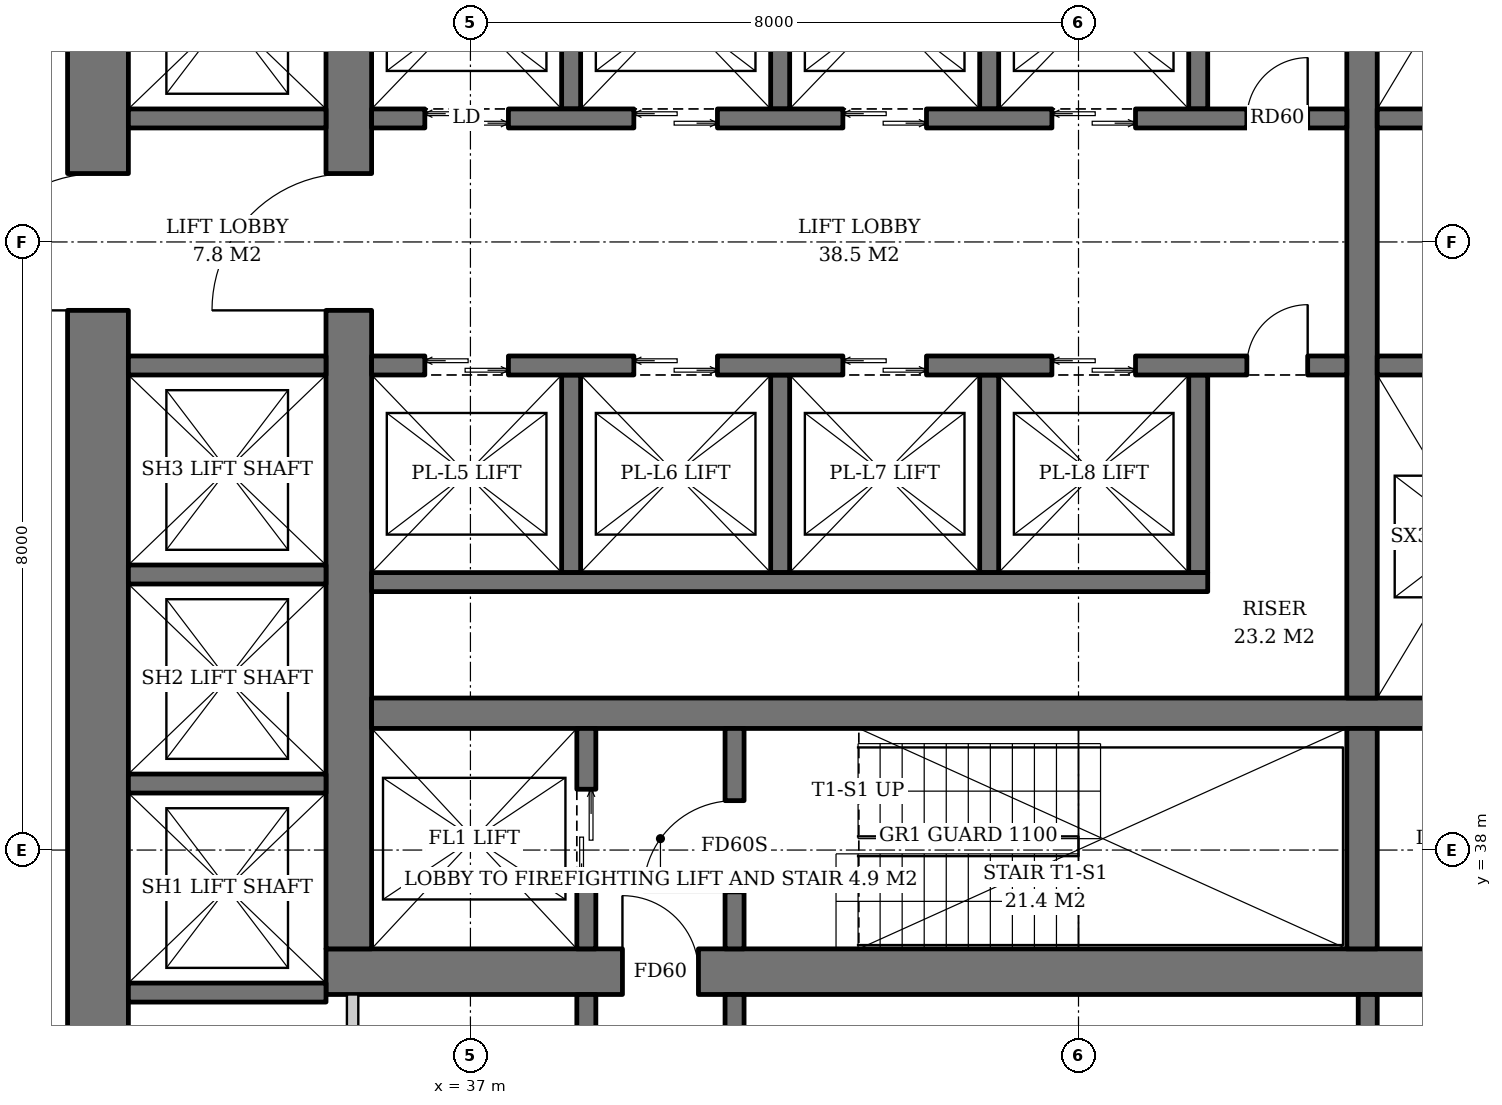
"""IFC4 building model, lengths in metres.
Left out: names, types, materials, properties, quantities, classifications, styles, units other than length and angle.
Written with IfcOpenShell. Run it as: python <this file> out.ifc"""

import sys

from ifc_helpers import new_model, si_unit, direction, frame, frame_2d, origin, place, context, subcontext, project, spatial, rectangle, extrude, element, fill, save


model = new_model("IFC4")
c1 = context("Model", 3, precision=1e-05, world=origin(), true_north=direction((0.0, 1.0)))
c2 = subcontext(c1, "Body", "Model", "MODEL_VIEW")
j1 = project(units=[si_unit("LENGTHUNIT", "METRE"), si_unit("PLANEANGLEUNIT", "RADIAN")], contexts=[c1])
p1 = place(None, origin())
s1 = spatial("IfcSite", under=j1, at=p1, CompositionType="ELEMENT")
p2 = place(p1, origin())
s2 = spatial("IfcBuilding", under=s1, at=p2, CompositionType="ELEMENT")
p3 = place(p2, frame((0.0, 0.0, 70.4)))
s3 = spatial("IfcBuildingStorey", under=s2, at=p3, CompositionType="ELEMENT", Elevation=70.4)
p4 = place(p3, frame((35.1, 36.4, 0.0), z_axis=(0.0, 0.0, 1.0), x_axis=(1.0, 0.0, 0.0)))
e1 = element("IfcWall", 1, at=p4, inside=s3, PredefinedType="SHEAR", context=c2, shape_type="SweptSolid", body=[
    extrude(rectangle(XDim=19.8, YDim=0.6, at=frame_2d((9.9, 0.0))), origin(), (0.0, 0.0, 1.0), 3.8),
])
p5 = place(p4, frame((3.9, 0.0, 0.0)))
e2 = element("IfcOpeningElement", 2, at=p5, cuts=e1, PredefinedType="OPENING", context=c2, shape_type="SweptSolid", body=[
    extrude(rectangle(XDim=1.0, YDim=2.1, at=frame_2d((0.5, 1.05))), frame((0.0, 0.31, 0.0), z_axis=(0.0, -1.0, 0.0), x_axis=(1.0, 0.0, 0.0)), (0.0, 0.0, 1.0), 0.62),
])
p6 = place(p4, frame((15.35, 0.0, 0.0)))
e3 = element("IfcOpeningElement", 3, at=p6, cuts=e1, PredefinedType="OPENING", context=c2, shape_type="SweptSolid", body=[
    extrude(rectangle(XDim=1.0, YDim=2.1, at=frame_2d((0.5, 1.05))), frame((0.0, 0.31, 0.0), z_axis=(0.0, -1.0, 0.0), x_axis=(1.0, 0.0, 0.0)), (0.0, 0.0, 1.0), 0.62),
])
p7 = place(p3, frame((35.4, 36.7, 0.0), z_axis=(0.0, 0.0, 1.0), x_axis=(0.0, 1.0, 0.0)))
e4 = element("IfcWall", 4, at=p7, inside=s3, PredefinedType="SHEAR", context=c2, shape_type="SweptSolid", body=[
    extrude(rectangle(XDim=18.6, YDim=0.6, at=frame_2d((9.3, 0.0))), origin(), (0.0, 0.0, 1.0), 3.8),
])
p8 = place(p7, frame((8.4, 0.0, 0.0)))
e5 = element("IfcOpeningElement", 5, at=p8, cuts=e4, PredefinedType="OPENING", context=c2, shape_type="SweptSolid", body=[
    extrude(rectangle(XDim=1.8, YDim=2.4, at=frame_2d((0.9, 1.2))), frame((0.0, 0.31, 0.0), z_axis=(0.0, -1.0, 0.0), x_axis=(1.0, 0.0, 0.0)), (0.0, 0.0, 1.0), 0.62),
])
p9 = place(p3, frame((32.1, 33.5, 0.0), z_axis=(0.0, 0.0, 1.0), x_axis=(0.0, 1.0, 0.0)))
e6 = element("IfcWall", 6, at=p9, inside=s3, PredefinedType="SHEAR", context=c2, shape_type="SweptSolid", body=[
    extrude(rectangle(XDim=25.0, YDim=0.8, at=frame_2d((12.5, 0.0))), origin(), (0.0, 0.0, 1.0), 3.8),
])
p10 = place(p9, frame((11.6, 0.0, 0.0)))
e7 = element("IfcOpeningElement", 7, at=p10, cuts=e6, PredefinedType="OPENING", context=c2, shape_type="SweptSolid", body=[
    extrude(rectangle(XDim=1.8, YDim=2.4, at=frame_2d((0.9, 1.2))), frame((0.0, 0.41, 0.0), z_axis=(0.0, -1.0, 0.0), x_axis=(1.0, 0.0, 0.0)), (0.0, 0.0, 1.0), 0.82),
])
p11 = place(p3, frame((35.7, 39.8, 0.0), z_axis=(0.0, 0.0, 1.0), x_axis=(1.0, 0.0, 0.0)))
e8 = element("IfcWall", 8, at=p11, inside=s3, PredefinedType="SHEAR", context=c2, shape_type="SweptSolid", body=[
    extrude(rectangle(XDim=18.6, YDim=0.4, at=frame_2d((9.3, 0.0))), origin(), (0.0, 0.0, 1.0), 3.8),
])
p12 = place(p3, frame((48.73, 36.7, 0.0), z_axis=(0.0, 0.0, 1.0), x_axis=(0.0, 1.0, 0.0)))
e9 = element("IfcWall", 9, at=p12, inside=s3, PredefinedType="SHEAR", context=c2, shape_type="SweptSolid", body=[
    extrude(rectangle(XDim=2.9, YDim=0.4, at=frame_2d((1.45, 0.0))), origin(), (0.0, 0.0, 1.0), 3.8),
])
p13 = place(p3, frame((48.73, 40.0, 0.0), z_axis=(0.0, 0.0, 1.0), x_axis=(0.0, 1.0, 0.0)))
e10 = element("IfcWall", 10, at=p13, inside=s3, PredefinedType="SHEAR", context=c2, shape_type="SweptSolid", body=[
    extrude(rectangle(XDim=12.0, YDim=0.4, at=frame_2d((6.0, 0.0))), origin(), (0.0, 0.0, 1.0), 3.8),
])
p14 = place(p3, frame((38.525, 36.7, 0.0), z_axis=(0.0, 0.0, 1.0), x_axis=(0.0, 1.0, 0.0)))
e11 = element("IfcWall", 11, at=p14, inside=s3, PredefinedType="SHEAR", context=c2, shape_type="SweptSolid", body=[
    extrude(rectangle(XDim=2.9, YDim=0.25, at=frame_2d((1.45, 0.0))), origin(), (0.0, 0.0, 1.0), 3.8),
])
p15 = place(p14, frame((0.8, 0.0, 0.0)))
e12 = element("IfcOpeningElement", 12, at=p15, cuts=e11, PredefinedType="OPENING", context=c2, shape_type="SweptSolid", body=[
    extrude(rectangle(XDim=1.3, YDim=2.2, at=frame_2d((0.65, 1.1))), frame((0.0, 0.135, 0.0), z_axis=(0.0, -1.0, 0.0), x_axis=(1.0, 0.0, 0.0)), (0.0, 0.0, 1.0), 0.27),
])
p16 = place(p3, frame((40.475, 36.7, 0.0), z_axis=(0.0, 0.0, 1.0), x_axis=(0.0, 1.0, 0.0)))
e13 = element("IfcWall", 13, at=p16, inside=s3, PredefinedType="SHEAR", context=c2, shape_type="SweptSolid", body=[
    extrude(rectangle(XDim=2.9, YDim=0.25, at=frame_2d((1.45, 0.0))), origin(), (0.0, 0.0, 1.0), 3.8),
])
p17 = place(p16, frame((0.75, 0.0, 0.0)))
e14 = element("IfcOpeningElement", 14, at=p17, cuts=e13, PredefinedType="OPENING", context=c2, shape_type="SweptSolid", body=[
    extrude(rectangle(XDim=1.2, YDim=2.1, at=frame_2d((0.6, 1.05))), frame((0.0, 0.135, 0.0), z_axis=(0.0, -1.0, 0.0), x_axis=(1.0, 0.0, 0.0)), (0.0, 0.0, 1.0), 0.27),
])
for number, where, z_axis, x_axis in (
    (15, (38.325, 47.75, 0.0), (0.0, 0.0, 1.0), (0.0, 1.0, 0.0)),
    (16, (41.075, 47.75, 0.0), (0.0, 0.0, 1.0), (0.0, 1.0, 0.0)),
    (17, (43.825, 47.75, 0.0), (0.0, 0.0, 1.0), (0.0, 1.0, 0.0)),
    (18, (46.575, 47.75, 0.0), (0.0, 0.0, 1.0), (0.0, 1.0, 0.0)),
):
    element("IfcWall", number, at=place(p3, frame(where, z_axis=z_axis, x_axis=x_axis)), inside=s3, PredefinedType="SHEAR", context=c2, shape_type="SweptSolid", body=[
        extrude(rectangle(XDim=2.6, YDim=0.25, at=frame_2d((1.3, 0.0))), origin(), (0.0, 0.0, 1.0), 3.8),
    ])
p18 = place(p3, frame((35.7, 47.625, 0.0), z_axis=(0.0, 0.0, 1.0), x_axis=(1.0, 0.0, 0.0)))
e19 = element("IfcWall", 19, at=p18, inside=s3, PredefinedType="SHEAR", context=c2, shape_type="SweptSolid", body=[
    extrude(rectangle(XDim=12.83, YDim=0.25, at=frame_2d((6.415, 0.0))), origin(), (0.0, 0.0, 1.0), 3.8),
])
p19 = place(p18, frame((0.7, 0.0, 0.0)))
e20 = element("IfcOpeningElement", 20, at=p19, cuts=e19, PredefinedType="OPENING", context=c2, shape_type="SweptSolid", body=[
    extrude(rectangle(XDim=1.1, YDim=2.2, at=frame_2d((0.55, 1.1))), frame((0.0, 0.135, 0.0), z_axis=(0.0, -1.0, 0.0), x_axis=(1.0, 0.0, 0.0)), (0.0, 0.0, 1.0), 0.27),
])
p20 = place(p18, frame((3.45, 0.0, 0.0)))
e21 = element("IfcOpeningElement", 21, at=p20, cuts=e19, PredefinedType="OPENING", context=c2, shape_type="SweptSolid", body=[
    extrude(rectangle(XDim=1.1, YDim=2.2, at=frame_2d((0.55, 1.1))), frame((0.0, 0.135, 0.0), z_axis=(0.0, -1.0, 0.0), x_axis=(1.0, 0.0, 0.0)), (0.0, 0.0, 1.0), 0.27),
])
p21 = place(p18, frame((6.2, 0.0, 0.0)))
e22 = element("IfcOpeningElement", 22, at=p21, cuts=e19, PredefinedType="OPENING", context=c2, shape_type="SweptSolid", body=[
    extrude(rectangle(XDim=1.1, YDim=2.2, at=frame_2d((0.55, 1.1))), frame((0.0, 0.135, 0.0), z_axis=(0.0, -1.0, 0.0), x_axis=(1.0, 0.0, 0.0)), (0.0, 0.0, 1.0), 0.27),
])
p22 = place(p18, frame((8.95, 0.0, 0.0)))
e23 = element("IfcOpeningElement", 23, at=p22, cuts=e19, PredefinedType="OPENING", context=c2, shape_type="SweptSolid", body=[
    extrude(rectangle(XDim=1.1, YDim=2.2, at=frame_2d((0.55, 1.1))), frame((0.0, 0.135, 0.0), z_axis=(0.0, -1.0, 0.0), x_axis=(1.0, 0.0, 0.0)), (0.0, 0.0, 1.0), 0.27),
])
p23 = place(p18, frame((11.515, 0.0, 0.0)))
e24 = element("IfcOpeningElement", 24, at=p23, cuts=e19, PredefinedType="OPENING", context=c2, shape_type="SweptSolid", body=[
    extrude(rectangle(XDim=0.8, YDim=2.0, at=frame_2d((0.4, 1.0))), frame((0.0, 0.135, 0.0), z_axis=(0.0, -1.0, 0.0), x_axis=(1.0, 0.0, 0.0)), (0.0, 0.0, 1.0), 0.27),
])
for number, where, z_axis, x_axis in (
    (25, (38.325, 44.25, 0.0), (0.0, 0.0, 1.0), (0.0, -1.0, 0.0)),
    (26, (41.075, 44.25, 0.0), (0.0, 0.0, 1.0), (0.0, -1.0, 0.0)),
    (27, (43.825, 44.25, 0.0), (0.0, 0.0, 1.0), (0.0, -1.0, 0.0)),
    (28, (46.575, 44.25, 0.0), (0.0, 0.0, 1.0), (0.0, -1.0, 0.0)),
):
    element("IfcWall", number, at=place(p3, frame(where, z_axis=z_axis, x_axis=x_axis)), inside=s3, PredefinedType="SHEAR", context=c2, shape_type="SweptSolid", body=[
        extrude(rectangle(XDim=2.6, YDim=0.25, at=frame_2d((1.3, 0.0))), origin(), (0.0, 0.0, 1.0), 3.8),
    ])
p24 = place(p3, frame((35.7, 41.525, 0.0), z_axis=(0.0, 0.0, 1.0), x_axis=(1.0, 0.0, 0.0)))
e29 = element("IfcWall", 29, at=p24, inside=s3, PredefinedType="SHEAR", context=c2, shape_type="SweptSolid", body=[
    extrude(rectangle(XDim=11.0, YDim=0.25, at=frame_2d((5.5, 0.0))), origin(), (0.0, 0.0, 1.0), 3.8),
])
p25 = place(p3, frame((35.7, 44.375, 0.0), z_axis=(0.0, 0.0, 1.0), x_axis=(1.0, 0.0, 0.0)))
e30 = element("IfcWall", 30, at=p25, inside=s3, PredefinedType="SHEAR", context=c2, shape_type="SweptSolid", body=[
    extrude(rectangle(XDim=12.83, YDim=0.25, at=frame_2d((6.415, 0.0))), origin(), (0.0, 0.0, 1.0), 3.8),
])
p26 = place(p25, frame((0.7, 0.0, 0.0)))
e31 = element("IfcOpeningElement", 31, at=p26, cuts=e30, PredefinedType="OPENING", context=c2, shape_type="SweptSolid", body=[
    extrude(rectangle(XDim=1.1, YDim=2.2, at=frame_2d((0.55, 1.1))), frame((0.0, 0.135, 0.0), z_axis=(0.0, -1.0, 0.0), x_axis=(1.0, 0.0, 0.0)), (0.0, 0.0, 1.0), 0.27),
])
p27 = place(p25, frame((3.45, 0.0, 0.0)))
e32 = element("IfcOpeningElement", 32, at=p27, cuts=e30, PredefinedType="OPENING", context=c2, shape_type="SweptSolid", body=[
    extrude(rectangle(XDim=1.1, YDim=2.2, at=frame_2d((0.55, 1.1))), frame((0.0, 0.135, 0.0), z_axis=(0.0, -1.0, 0.0), x_axis=(1.0, 0.0, 0.0)), (0.0, 0.0, 1.0), 0.27),
])
p28 = place(p25, frame((6.2, 0.0, 0.0)))
e33 = element("IfcOpeningElement", 33, at=p28, cuts=e30, PredefinedType="OPENING", context=c2, shape_type="SweptSolid", body=[
    extrude(rectangle(XDim=1.1, YDim=2.2, at=frame_2d((0.55, 1.1))), frame((0.0, 0.135, 0.0), z_axis=(0.0, -1.0, 0.0), x_axis=(1.0, 0.0, 0.0)), (0.0, 0.0, 1.0), 0.27),
])
p29 = place(p25, frame((8.95, 0.0, 0.0)))
e34 = element("IfcOpeningElement", 34, at=p29, cuts=e30, PredefinedType="OPENING", context=c2, shape_type="SweptSolid", body=[
    extrude(rectangle(XDim=1.1, YDim=2.2, at=frame_2d((0.55, 1.1))), frame((0.0, 0.135, 0.0), z_axis=(0.0, -1.0, 0.0), x_axis=(1.0, 0.0, 0.0)), (0.0, 0.0, 1.0), 0.27),
])
p30 = place(p25, frame((11.515, 0.0, 0.0)))
e35 = element("IfcOpeningElement", 35, at=p30, cuts=e30, PredefinedType="OPENING", context=c2, shape_type="SweptSolid", body=[
    extrude(rectangle(XDim=0.8, YDim=2.0, at=frame_2d((0.4, 1.0))), frame((0.0, 0.135, 0.0), z_axis=(0.0, -1.0, 0.0), x_axis=(1.0, 0.0, 0.0)), (0.0, 0.0, 1.0), 0.27),
])
for number, where, z_axis, x_axis in (
    (36, (48.93, 47.625, 0.0), (0.0, 0.0, 1.0), (1.0, 0.0, 0.0)),
    (37, (48.93, 44.375, 0.0), (0.0, 0.0, 1.0), (1.0, 0.0, 0.0)),
):
    element("IfcWall", number, at=place(p3, frame(where, z_axis=z_axis, x_axis=x_axis)), inside=s3, PredefinedType="SHEAR", context=c2, shape_type="SweptSolid", body=[
        extrude(rectangle(XDim=5.37, YDim=0.25, at=frame_2d((2.685, 0.0))), origin(), (0.0, 0.0, 1.0), 3.8),
    ])
for number, where, z_axis, x_axis in (
    (38, (32.5, 36.125, 0.0), (0.0, 0.0, 1.0), (1.0, 0.0, 0.0)),
    (39, (32.5, 38.875, 0.0), (0.0, 0.0, 1.0), (1.0, 0.0, 0.0)),
    (40, (32.5, 41.625, 0.0), (0.0, 0.0, 1.0), (1.0, 0.0, 0.0)),
    (41, (32.5, 44.375, 0.0), (0.0, 0.0, 1.0), (1.0, 0.0, 0.0)),
    (42, (32.5, 47.625, 0.0), (0.0, 0.0, 1.0), (1.0, 0.0, 0.0)),
):
    element("IfcWall", number, at=place(p3, frame(where, z_axis=z_axis, x_axis=x_axis)), inside=s3, PredefinedType="SHEAR", context=c2, shape_type="SweptSolid", body=[
        extrude(rectangle(XDim=2.6, YDim=0.25, at=frame_2d((1.3, 0.0))), origin(), (0.0, 0.0, 1.0), 3.8),
    ])
for number, where, z_axis, x_axis in (
    (43, (38.525, 33.5, 0.0), (0.0, 0.0, 1.0), (0.0, 1.0, 0.0)),
    (44, (40.475, 33.5, 0.0), (0.0, 0.0, 1.0), (0.0, 1.0, 0.0)),
    (45, (48.805, 33.5, 0.0), (0.0, 0.0, 1.0), (0.0, 1.0, 0.0)),
):
    element("IfcWall", number, at=place(p3, frame(where, z_axis=z_axis, x_axis=x_axis)), inside=s3, PredefinedType="SOLIDWALL", context=c2, shape_type="SweptSolid", body=[
        extrude(rectangle(XDim=2.6, YDim=0.25, at=frame_2d((1.3, 0.0))), origin(), (0.0, 0.0, 1.0), 3.62),
    ])
p31 = place(p3, frame((35.45, 33.5, 0.0), z_axis=(0.0, 0.0, 1.0), x_axis=(0.0, 1.0, 0.0)))
e46 = element("IfcWall", 46, at=p31, inside=s3, PredefinedType="SOLIDWALL", context=c2, shape_type="SweptSolid", body=[
    extrude(rectangle(XDim=2.6, YDim=0.15, at=frame_2d((1.3, 0.0))), origin(), (0.0, 0.0, 1.0), 3.62),
])
p32 = place(p15, origin())
e47 = element("IfcDoor", 47, at=p32, inside=s3, OperationType="DOUBLE_DOOR_SLIDING", PredefinedType="DOOR", context=c2, shape_type="SweptSolid", body=[
    extrude(rectangle(XDim=1.3, YDim=2.2, at=frame_2d((0.65, 1.1))), frame((0.0, 0.025, 0.0), z_axis=(0.0, -1.0, 0.0), x_axis=(1.0, 0.0, 0.0)), (0.0, 0.0, 1.0), 0.05),
])
fill(e12, e47)
p33 = place(p17, origin())
e48 = element("IfcDoor", 48, at=p33, inside=s3, OperationType="SINGLE_SWING_LEFT", PredefinedType="DOOR", context=c2, shape_type="SweptSolid", body=[
    extrude(rectangle(XDim=1.2, YDim=2.1, at=frame_2d((0.6, 1.05))), frame((0.0, 0.025, 0.0), z_axis=(0.0, -1.0, 0.0), x_axis=(1.0, 0.0, 0.0)), (0.0, 0.0, 1.0), 0.05),
])
fill(e14, e48)
p34 = place(p19, origin())
e49 = element("IfcDoor", 49, at=p34, inside=s3, OperationType="DOUBLE_DOOR_SLIDING", PredefinedType="DOOR", context=c2, shape_type="SweptSolid", body=[
    extrude(rectangle(XDim=1.1, YDim=2.2, at=frame_2d((0.55, 1.1))), frame((0.0, 0.025, 0.0), z_axis=(0.0, -1.0, 0.0), x_axis=(1.0, 0.0, 0.0)), (0.0, 0.0, 1.0), 0.05),
])
fill(e20, e49)
p35 = place(p20, origin())
e50 = element("IfcDoor", 50, at=p35, inside=s3, OperationType="DOUBLE_DOOR_SLIDING", PredefinedType="DOOR", context=c2, shape_type="SweptSolid", body=[
    extrude(rectangle(XDim=1.1, YDim=2.2, at=frame_2d((0.55, 1.1))), frame((0.0, 0.025, 0.0), z_axis=(0.0, -1.0, 0.0), x_axis=(1.0, 0.0, 0.0)), (0.0, 0.0, 1.0), 0.05),
])
fill(e21, e50)
p36 = place(p21, origin())
e51 = element("IfcDoor", 51, at=p36, inside=s3, OperationType="DOUBLE_DOOR_SLIDING", PredefinedType="DOOR", context=c2, shape_type="SweptSolid", body=[
    extrude(rectangle(XDim=1.1, YDim=2.2, at=frame_2d((0.55, 1.1))), frame((0.0, 0.025, 0.0), z_axis=(0.0, -1.0, 0.0), x_axis=(1.0, 0.0, 0.0)), (0.0, 0.0, 1.0), 0.05),
])
fill(e22, e51)
p37 = place(p22, origin())
e52 = element("IfcDoor", 52, at=p37, inside=s3, OperationType="DOUBLE_DOOR_SLIDING", PredefinedType="DOOR", context=c2, shape_type="SweptSolid", body=[
    extrude(rectangle(XDim=1.1, YDim=2.2, at=frame_2d((0.55, 1.1))), frame((0.0, 0.025, 0.0), z_axis=(0.0, -1.0, 0.0), x_axis=(1.0, 0.0, 0.0)), (0.0, 0.0, 1.0), 0.05),
])
fill(e23, e52)
p38 = place(p23, origin())
e53 = element("IfcDoor", 53, at=p38, inside=s3, OperationType="SINGLE_SWING_RIGHT", PredefinedType="DOOR", context=c2, shape_type="SweptSolid", body=[
    extrude(rectangle(XDim=0.8, YDim=2.0, at=frame_2d((0.4, 1.0))), frame((0.0, 0.025, 0.0), z_axis=(0.0, -1.0, 0.0), x_axis=(1.0, 0.0, 0.0)), (0.0, 0.0, 1.0), 0.05),
])
fill(e24, e53)
p39 = place(p26, origin())
e54 = element("IfcDoor", 54, at=p39, inside=s3, OperationType="DOUBLE_DOOR_SLIDING", PredefinedType="DOOR", context=c2, shape_type="SweptSolid", body=[
    extrude(rectangle(XDim=1.1, YDim=2.2, at=frame_2d((0.55, 1.1))), frame((0.0, 0.025, 0.0), z_axis=(0.0, -1.0, 0.0), x_axis=(1.0, 0.0, 0.0)), (0.0, 0.0, 1.0), 0.05),
])
fill(e31, e54)
p40 = place(p27, origin())
e55 = element("IfcDoor", 55, at=p40, inside=s3, OperationType="DOUBLE_DOOR_SLIDING", PredefinedType="DOOR", context=c2, shape_type="SweptSolid", body=[
    extrude(rectangle(XDim=1.1, YDim=2.2, at=frame_2d((0.55, 1.1))), frame((0.0, 0.025, 0.0), z_axis=(0.0, -1.0, 0.0), x_axis=(1.0, 0.0, 0.0)), (0.0, 0.0, 1.0), 0.05),
])
fill(e32, e55)
p41 = place(p28, origin())
e56 = element("IfcDoor", 56, at=p41, inside=s3, OperationType="DOUBLE_DOOR_SLIDING", PredefinedType="DOOR", context=c2, shape_type="SweptSolid", body=[
    extrude(rectangle(XDim=1.1, YDim=2.2, at=frame_2d((0.55, 1.1))), frame((0.0, 0.025, 0.0), z_axis=(0.0, -1.0, 0.0), x_axis=(1.0, 0.0, 0.0)), (0.0, 0.0, 1.0), 0.05),
])
fill(e33, e56)
p42 = place(p29, origin())
e57 = element("IfcDoor", 57, at=p42, inside=s3, OperationType="DOUBLE_DOOR_SLIDING", PredefinedType="DOOR", context=c2, shape_type="SweptSolid", body=[
    extrude(rectangle(XDim=1.1, YDim=2.2, at=frame_2d((0.55, 1.1))), frame((0.0, 0.025, 0.0), z_axis=(0.0, -1.0, 0.0), x_axis=(1.0, 0.0, 0.0)), (0.0, 0.0, 1.0), 0.05),
])
fill(e34, e57)
p43 = place(p30, origin())
e58 = element("IfcDoor", 58, at=p43, inside=s3, OperationType="SINGLE_SWING_RIGHT", PredefinedType="DOOR", context=c2, shape_type="SweptSolid", body=[
    extrude(rectangle(XDim=0.8, YDim=2.0, at=frame_2d((0.4, 1.0))), frame((0.0, 0.025, 0.0), z_axis=(0.0, -1.0, 0.0), x_axis=(1.0, 0.0, 0.0)), (0.0, 0.0, 1.0), 0.05),
])
fill(e35, e58)
p44 = place(p5, origin())
e59 = element("IfcDoor", 59, at=p44, inside=s3, OperationType="SINGLE_SWING_LEFT", PredefinedType="DOOR", context=c2, shape_type="SweptSolid", body=[
    extrude(rectangle(XDim=1.0, YDim=2.1, at=frame_2d((0.5, 1.05))), frame((0.0, 0.025, 0.0), z_axis=(0.0, -1.0, 0.0), x_axis=(1.0, 0.0, 0.0)), (0.0, 0.0, 1.0), 0.05),
])
fill(e2, e59)
p45 = place(p8, origin())
e60 = element("IfcDoor", 60, at=p45, inside=s3, OperationType="DOUBLE_DOOR_SINGLE_SWING", PredefinedType="DOOR", context=c2, shape_type="SweptSolid", body=[
    extrude(rectangle(XDim=1.8, YDim=2.4, at=frame_2d((0.9, 1.2))), frame((0.0, 0.025, 0.0), z_axis=(0.0, -1.0, 0.0), x_axis=(1.0, 0.0, 0.0)), (0.0, 0.0, 1.0), 0.05),
])
fill(e5, e60)
p46 = place(p10, origin())
e61 = element("IfcDoor", 61, at=p46, inside=s3, OperationType="DOUBLE_DOOR_SINGLE_SWING", PredefinedType="DOOR", context=c2, shape_type="SweptSolid", body=[
    extrude(rectangle(XDim=1.8, YDim=2.4, at=frame_2d((0.9, 1.2))), frame((0.0, 0.025, 0.0), z_axis=(0.0, -1.0, 0.0), x_axis=(1.0, 0.0, 0.0)), (0.0, 0.0, 1.0), 0.05),
])
fill(e7, e61)
save(model, sys.argv[1])
